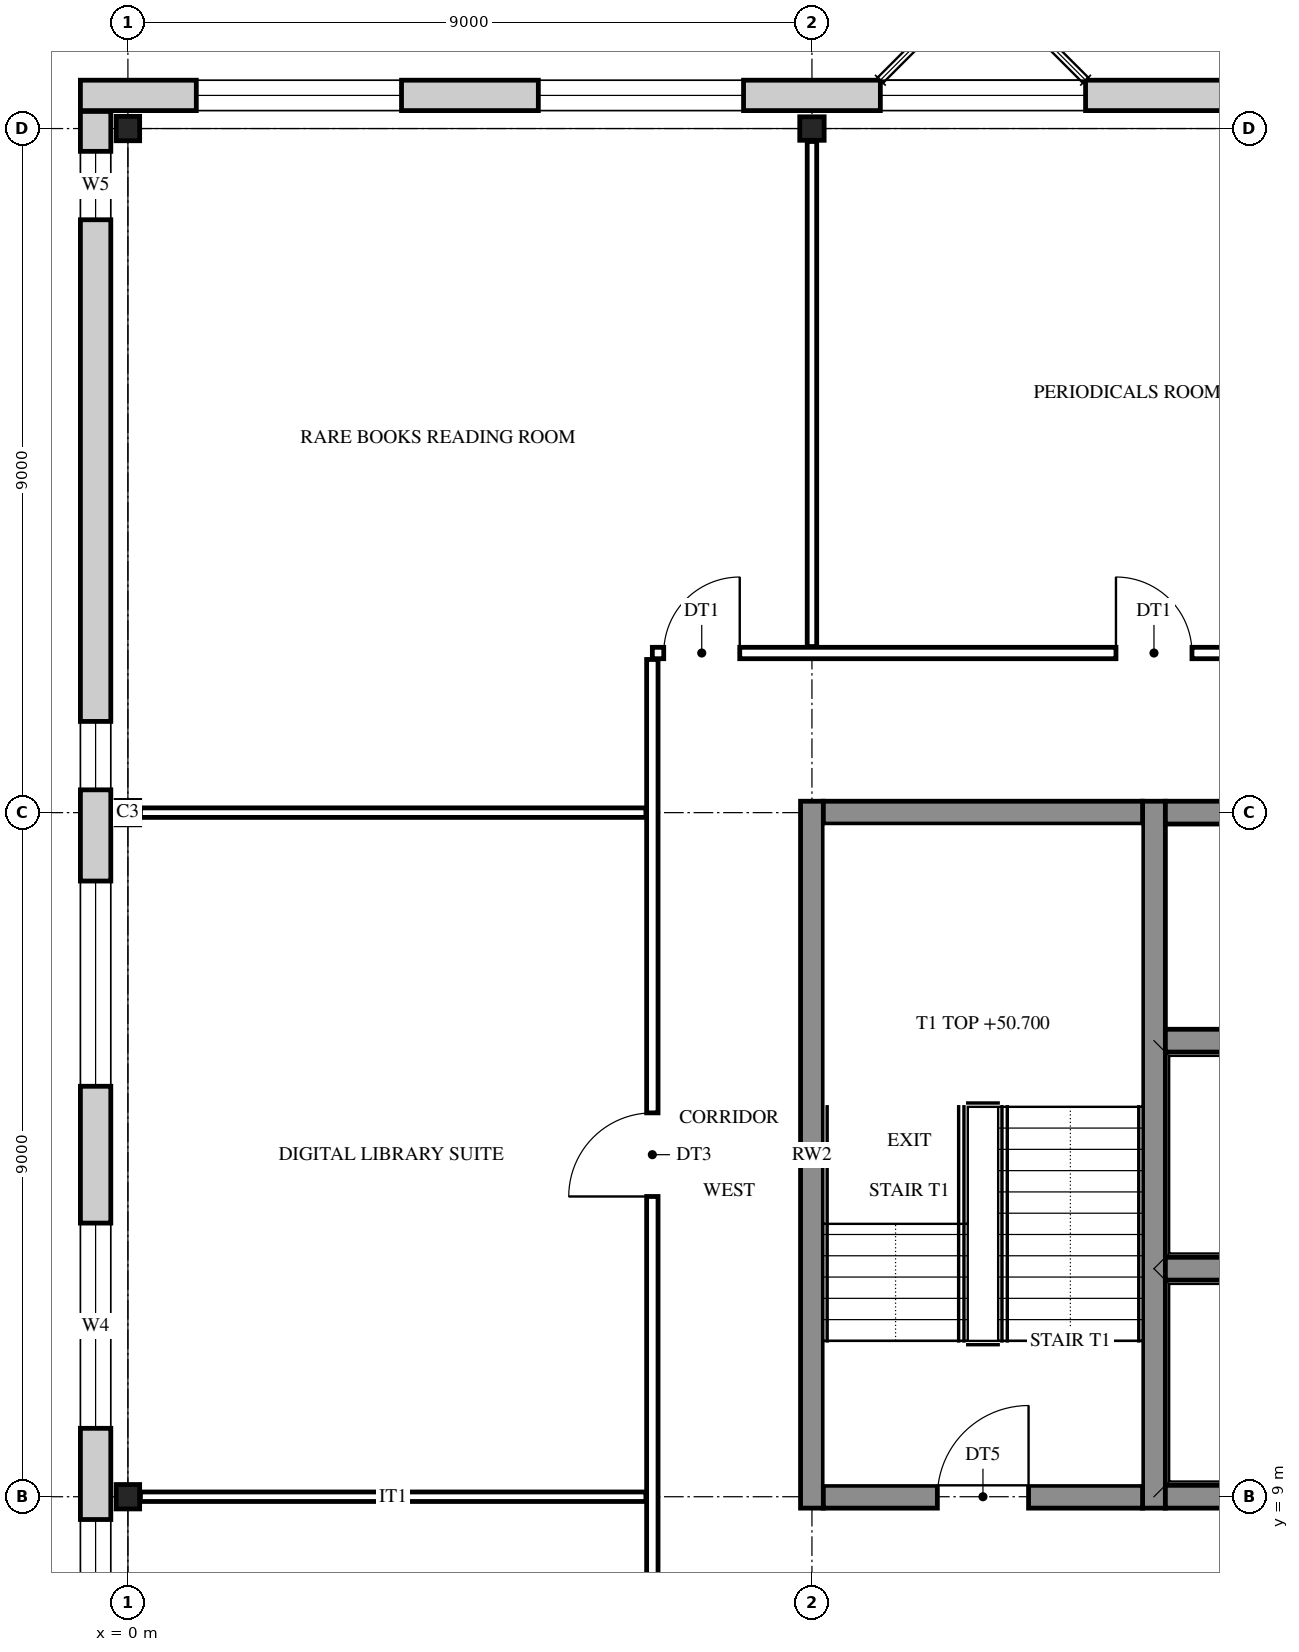
"""IFC4 building model, lengths in metres.
Left out: names, types, materials, properties, quantities, classifications, styles, units other than length and angle.
Written with IfcOpenShell. Run it as: python <this file> out.ifc"""

import sys

from ifc_helpers import new_model, si_unit, direction, frame, frame_2d, origin, origin_2d, place, context, subcontext, project, spatial, rectangle, i_section, extrude, element, fill, save


model = new_model("IFC4")
c1 = context("Model", 3, precision=1e-05, world=origin(), true_north=direction((0.0, 1.0)))
c2 = subcontext(c1, "Body", "Model", "MODEL_VIEW")
j1 = project(units=[si_unit("LENGTHUNIT", "METRE"), si_unit("PLANEANGLEUNIT", "RADIAN")], contexts=[c1])
p1 = place(None, origin())
s1 = spatial("IfcSite", under=j1, at=p1, CompositionType="ELEMENT")
p2 = place(p1, origin())
s2 = spatial("IfcBuilding", under=s1, at=p2, CompositionType="ELEMENT")
p3 = place(p2, frame((0.0, 0.0, 48.6)))
s3 = spatial("IfcBuildingStorey", under=s2, at=p3, CompositionType="ELEMENT", Elevation=48.6)
for number, where, z_axis, x_axis in (
    (1, (0.0, 9.0, 0.0), (0.0, 0.0, 1.0), (1.0, 0.0, 0.0)),
    (2, (0.0, 18.0, 0.0), (0.0, 0.0, 1.0), (1.0, 0.0, 0.0)),
    (3, (0.0, 27.0, 0.0), (0.0, 0.0, 1.0), (1.0, 0.0, 0.0)),
    (4, (9.0, 27.0, 0.0), (0.0, 0.0, 1.0), (0.0, 1.0, 0.0)),
):
    element("IfcColumn", number, at=place(p3, frame(where, z_axis=z_axis, x_axis=x_axis)), inside=s3, PredefinedType="COLUMN", context=c2, shape_type="SweptSolid", body=[
        extrude(i_section(OverallWidth=0.309, OverallDepth=0.321, WebThickness=0.014, FlangeThickness=0.022, FilletRadius=0.017, at=origin_2d()), origin(), (0.0, 0.0, 1.0), 4.2),
    ])
for number, where, z_axis, x_axis in (
    (5, (9.0, 8.85, 0.0), (0.0, 0.0, 1.0), (0.0, 1.0, 0.0)),
    (6, (13.5, 8.85, 0.0), (0.0, 0.0, 1.0), (0.0, 1.0, 0.0)),
):
    element("IfcWall", number, at=place(p3, frame(where, z_axis=z_axis, x_axis=x_axis)), inside=s3, PredefinedType="SHEAR", context=c2, shape_type="SweptSolid", body=[
        extrude(rectangle(XDim=9.3, YDim=0.3, at=frame_2d((4.65, 0.0))), origin(), (0.0, 0.0, 1.0), 4.2),
    ])
p4 = place(p3, frame((9.15, 9.0, 0.0), z_axis=(0.0, 0.0, 1.0), x_axis=(1.0, 0.0, 0.0)))
e7 = element("IfcWall", 7, at=p4, inside=s3, PredefinedType="SHEAR", context=c2, shape_type="SweptSolid", body=[
    extrude(rectangle(XDim=4.2, YDim=0.3, at=frame_2d((2.1, 0.0))), origin(), (0.0, 0.0, 1.0), 4.2),
])
p5 = place(p4, frame((1.5, 0.0, 0.0)))
e8 = element("IfcOpeningElement", 8, at=p5, cuts=e7, PredefinedType="OPENING", context=c2, shape_type="SweptSolid", body=[
    extrude(rectangle(XDim=1.2, YDim=2.1, at=frame_2d((0.6, 1.05))), frame((0.0, 0.16, 0.0), z_axis=(0.0, -1.0, 0.0), x_axis=(1.0, 0.0, 0.0)), (0.0, 0.0, 1.0), 0.32),
])
for number, where, z_axis, x_axis in (
    (9, (13.65, 9.0, 0.0), (0.0, 0.0, 1.0), (1.0, 0.0, 0.0)),
    (10, (13.65, 12.0, 0.0), (0.0, 0.0, 1.0), (1.0, 0.0, 0.0)),
    (11, (13.65, 15.0, 0.0), (0.0, 0.0, 1.0), (1.0, 0.0, 0.0)),
):
    element("IfcWall", number, at=place(p3, frame(where, z_axis=z_axis, x_axis=x_axis)), inside=s3, PredefinedType="SHEAR", context=c2, shape_type="SweptSolid", body=[
        extrude(rectangle(XDim=2.7, YDim=0.3, at=frame_2d((1.35, 0.0))), origin(), (0.0, 0.0, 1.0), 4.2),
    ])
p6 = place(p3, frame((9.15, 18.0, 0.0), z_axis=(0.0, 0.0, 1.0), x_axis=(1.0, 0.0, 0.0)))
e12 = element("IfcWall", 12, at=p6, inside=s3, PredefinedType="SHEAR", context=c2, shape_type="SweptSolid", body=[
    extrude(rectangle(XDim=4.2, YDim=0.3, at=frame_2d((2.1, 0.0))), origin(), (0.0, 0.0, 1.0), 4.2),
])
p7 = place(p3, frame((13.65, 18.0, 0.0), z_axis=(0.0, 0.0, 1.0), x_axis=(1.0, 0.0, 0.0)))
e13 = element("IfcWall", 13, at=p7, inside=s3, PredefinedType="SHEAR", context=c2, shape_type="SweptSolid", body=[
    extrude(rectangle(XDim=2.7, YDim=0.3, at=frame_2d((1.35, 0.0))), origin(), (0.0, 0.0, 1.0), 4.2),
])
p8 = place(p3, frame((-0.425, -0.225, 0.0), z_axis=(0.0, 0.0, 1.0), x_axis=(0.0, 1.0, 0.0)))
e14 = element("IfcWall", 14, at=p8, inside=s3, PredefinedType="STANDARD", context=c2, shape_type="SweptSolid", body=[
    extrude(rectangle(XDim=27.45, YDim=0.4, at=frame_2d((13.725, 0.0))), origin(), (0.0, 0.0, 1.0), 4.2),
])
p9 = place(p8, frame((0.525, 0.0, 0.9)))
e15 = element("IfcOpeningElement", 15, at=p9, cuts=e14, PredefinedType="OPENING", context=c2, shape_type="SweptSolid", body=[
    extrude(rectangle(XDim=0.9, YDim=2.0, at=frame_2d((0.45, 1.0))), frame((0.0, 0.21, 0.0), z_axis=(0.0, -1.0, 0.0), x_axis=(1.0, 0.0, 0.0)), (0.0, 0.0, 1.0), 0.42),
])
p10 = place(p8, frame((8.025, 0.0, 0.9)))
e16 = element("IfcOpeningElement", 16, at=p10, cuts=e14, PredefinedType="OPENING", context=c2, shape_type="SweptSolid", body=[
    extrude(rectangle(XDim=0.9, YDim=2.0, at=frame_2d((0.45, 1.0))), frame((0.0, 0.21, 0.0), z_axis=(0.0, -1.0, 0.0), x_axis=(1.0, 0.0, 0.0)), (0.0, 0.0, 1.0), 0.42),
])
p11 = place(p8, frame((10.125, 0.0, 0.9)))
e17 = element("IfcOpeningElement", 17, at=p11, cuts=e14, PredefinedType="OPENING", context=c2, shape_type="SweptSolid", body=[
    extrude(rectangle(XDim=2.7, YDim=2.5, at=frame_2d((1.35, 1.25))), frame((0.0, 0.21, 0.0), z_axis=(0.0, -1.0, 0.0), x_axis=(1.0, 0.0, 0.0)), (0.0, 0.0, 1.0), 0.42),
])
p12 = place(p8, frame((14.625, 0.0, 0.9)))
e18 = element("IfcOpeningElement", 18, at=p12, cuts=e14, PredefinedType="OPENING", context=c2, shape_type="SweptSolid", body=[
    extrude(rectangle(XDim=2.7, YDim=2.5, at=frame_2d((1.35, 1.25))), frame((0.0, 0.21, 0.0), z_axis=(0.0, -1.0, 0.0), x_axis=(1.0, 0.0, 0.0)), (0.0, 0.0, 1.0), 0.42),
])
p13 = place(p8, frame((18.525, 0.0, 0.9)))
e19 = element("IfcOpeningElement", 19, at=p13, cuts=e14, PredefinedType="OPENING", context=c2, shape_type="SweptSolid", body=[
    extrude(rectangle(XDim=0.9, YDim=2.0, at=frame_2d((0.45, 1.0))), frame((0.0, 0.21, 0.0), z_axis=(0.0, -1.0, 0.0), x_axis=(1.0, 0.0, 0.0)), (0.0, 0.0, 1.0), 0.42),
])
p14 = place(p8, frame((26.025, 0.0, 0.9)))
e20 = element("IfcOpeningElement", 20, at=p14, cuts=e14, PredefinedType="OPENING", context=c2, shape_type="SweptSolid", body=[
    extrude(rectangle(XDim=0.9, YDim=2.0, at=frame_2d((0.45, 1.0))), frame((0.0, 0.21, 0.0), z_axis=(0.0, -1.0, 0.0), x_axis=(1.0, 0.0, 0.0)), (0.0, 0.0, 1.0), 0.42),
])
p15 = place(p3, frame((-0.625, 27.436, 0.0), z_axis=(0.0, 0.0, 1.0), x_axis=(1.0, 0.0, 0.0)))
e21 = element("IfcWall", 21, at=p15, inside=s3, PredefinedType="STANDARD", context=c2, shape_type="SweptSolid", body=[
    extrude(rectangle(XDim=32.75, YDim=0.4, at=frame_2d((16.375, 0.0))), origin(), (0.0, 0.0, 1.0), 4.2),
])
p16 = place(p15, frame((1.525, 0.0, 0.9)))
e22 = element("IfcOpeningElement", 22, at=p16, cuts=e21, PredefinedType="OPENING", context=c2, shape_type="SweptSolid", body=[
    extrude(rectangle(XDim=2.7, YDim=2.5, at=frame_2d((1.35, 1.25))), frame((0.0, 0.21, 0.0), z_axis=(0.0, -1.0, 0.0), x_axis=(1.0, 0.0, 0.0)), (0.0, 0.0, 1.0), 0.42),
])
p17 = place(p15, frame((6.025, 0.0, 0.9)))
e23 = element("IfcOpeningElement", 23, at=p17, cuts=e21, PredefinedType="OPENING", context=c2, shape_type="SweptSolid", body=[
    extrude(rectangle(XDim=2.7, YDim=2.5, at=frame_2d((1.35, 1.25))), frame((0.0, 0.21, 0.0), z_axis=(0.0, -1.0, 0.0), x_axis=(1.0, 0.0, 0.0)), (0.0, 0.0, 1.0), 0.42),
])
p18 = place(p15, frame((10.525, 0.0, 0.9)))
e24 = element("IfcOpeningElement", 24, at=p18, cuts=e21, PredefinedType="OPENING", context=c2, shape_type="SweptSolid", body=[
    extrude(rectangle(XDim=2.7, YDim=2.5, at=frame_2d((1.35, 1.25))), frame((0.0, 0.21, 0.0), z_axis=(0.0, -1.0, 0.0), x_axis=(1.0, 0.0, 0.0)), (0.0, 0.0, 1.0), 0.42),
])
p19 = place(p15, frame((15.025, 0.0, 0.9)))
e25 = element("IfcOpeningElement", 25, at=p19, cuts=e21, PredefinedType="OPENING", context=c2, shape_type="SweptSolid", body=[
    extrude(rectangle(XDim=2.7, YDim=2.5, at=frame_2d((1.35, 1.25))), frame((0.0, 0.21, 0.0), z_axis=(0.0, -1.0, 0.0), x_axis=(1.0, 0.0, 0.0)), (0.0, 0.0, 1.0), 0.42),
])
p20 = place(p15, frame((19.525, 0.0, 0.9)))
e26 = element("IfcOpeningElement", 26, at=p20, cuts=e21, PredefinedType="OPENING", context=c2, shape_type="SweptSolid", body=[
    extrude(rectangle(XDim=2.7, YDim=2.5, at=frame_2d((1.35, 1.25))), frame((0.0, 0.21, 0.0), z_axis=(0.0, -1.0, 0.0), x_axis=(1.0, 0.0, 0.0)), (0.0, 0.0, 1.0), 0.42),
])
p21 = place(p15, frame((24.025, 0.0, 0.9)))
e27 = element("IfcOpeningElement", 27, at=p21, cuts=e21, PredefinedType="OPENING", context=c2, shape_type="SweptSolid", body=[
    extrude(rectangle(XDim=2.7, YDim=2.5, at=frame_2d((1.35, 1.25))), frame((0.0, 0.21, 0.0), z_axis=(0.0, -1.0, 0.0), x_axis=(1.0, 0.0, 0.0)), (0.0, 0.0, 1.0), 0.42),
])
p22 = place(p15, frame((28.525, 0.0, 0.9)))
e28 = element("IfcOpeningElement", 28, at=p22, cuts=e21, PredefinedType="OPENING", context=c2, shape_type="SweptSolid", body=[
    extrude(rectangle(XDim=2.7, YDim=2.5, at=frame_2d((1.35, 1.25))), frame((0.0, 0.21, 0.0), z_axis=(0.0, -1.0, 0.0), x_axis=(1.0, 0.0, 0.0)), (0.0, 0.0, 1.0), 0.42),
])
p23 = place(p3, frame((6.9, 6.985, 0.0), z_axis=(0.0, 0.0, 1.0), x_axis=(0.0, 1.0, 0.0)))
e29 = element("IfcWall", 29, at=p23, inside=s3, PredefinedType="PARTITIONING", context=c2, shape_type="SweptSolid", body=[
    extrude(rectangle(XDim=13.03, YDim=0.15, at=frame_2d((6.515, 0.0))), origin(), (0.0, 0.0, 1.0), 3.542),
])
p24 = place(p23, frame((5.965, 0.0, 0.0)))
e30 = element("IfcOpeningElement", 30, at=p24, cuts=e29, PredefinedType="OPENING", context=c2, shape_type="SweptSolid", body=[
    extrude(rectangle(XDim=1.1, YDim=2.1, at=frame_2d((0.55, 1.05))), frame((0.0, 0.085, 0.0), z_axis=(0.0, -1.0, 0.0), x_axis=(1.0, 0.0, 0.0)), (0.0, 0.0, 1.0), 0.17),
])
p25 = place(p3, frame((9.0, 20.185, 0.0), z_axis=(0.0, 0.0, 1.0), x_axis=(0.0, 1.0, 0.0)))
e31 = element("IfcWall", 31, at=p25, inside=s3, PredefinedType="PARTITIONING", context=c2, shape_type="SweptSolid", body=[
    extrude(rectangle(XDim=6.645, YDim=0.125, at=frame_2d((3.322, 0.0))), origin(), (0.0, 0.0, 1.0), 3.542),
])
for number, where, z_axis, x_axis in (
    (32, (0.165, 9.0, 0.0), (0.0, 0.0, 1.0), (1.0, 0.0, 0.0)),
    (33, (0.165, 18.0, 0.0), (0.0, 0.0, 1.0), (1.0, 0.0, 0.0)),
):
    element("IfcWall", number, at=place(p3, frame(where, z_axis=z_axis, x_axis=x_axis)), inside=s3, PredefinedType="PARTITIONING", context=c2, shape_type="SweptSolid", body=[
        extrude(rectangle(XDim=6.65, YDim=0.125, at=frame_2d((3.325, 0.0))), origin(), (0.0, 0.0, 1.0), 3.542),
    ])
p26 = place(p3, frame((6.9, 20.1, 0.0), z_axis=(0.0, 0.0, 1.0), x_axis=(1.0, 0.0, 0.0)))
e34 = element("IfcWall", 34, at=p26, inside=s3, PredefinedType="PARTITIONING", context=c2, shape_type="SweptSolid", body=[
    extrude(rectangle(XDim=20.1, YDim=0.15, at=frame_2d((10.05, 0.0))), origin(), (0.0, 0.0, 1.0), 3.542),
])
p27 = place(p26, frame((0.15, 0.0, 0.0)))
e35 = element("IfcOpeningElement", 35, at=p27, cuts=e34, PredefinedType="OPENING", context=c2, shape_type="SweptSolid", body=[
    extrude(rectangle(XDim=1.0, YDim=2.1, at=frame_2d((0.5, 1.05))), frame((0.0, 0.085, 0.0), z_axis=(0.0, -1.0, 0.0), x_axis=(1.0, 0.0, 0.0)), (0.0, 0.0, 1.0), 0.17),
])
p28 = place(p26, frame((6.1, 0.0, 0.0)))
e36 = element("IfcOpeningElement", 36, at=p28, cuts=e34, PredefinedType="OPENING", context=c2, shape_type="SweptSolid", body=[
    extrude(rectangle(XDim=1.0, YDim=2.1, at=frame_2d((0.5, 1.05))), frame((0.0, 0.085, 0.0), z_axis=(0.0, -1.0, 0.0), x_axis=(1.0, 0.0, 0.0)), (0.0, 0.0, 1.0), 0.17),
])
p29 = place(p26, frame((16.3, 0.0, 0.0)))
e37 = element("IfcOpeningElement", 37, at=p29, cuts=e34, PredefinedType="OPENING", context=c2, shape_type="SweptSolid", body=[
    extrude(rectangle(XDim=1.0, YDim=2.1, at=frame_2d((0.5, 1.05))), frame((0.0, 0.085, 0.0), z_axis=(0.0, -1.0, 0.0), x_axis=(1.0, 0.0, 0.0)), (0.0, 0.0, 1.0), 0.17),
])
p30 = place(p10, origin())
e38 = element("IfcWindow", 38, at=p30, inside=s3, PartitioningType="SINGLE_PANEL", PredefinedType="WINDOW", context=c2, shape_type="SweptSolid", body=[
    extrude(rectangle(XDim=0.9, YDim=2.0, at=frame_2d((0.45, 1.0))), frame((0.0, 0.03, 0.0), z_axis=(0.0, -1.0, 0.0), x_axis=(1.0, 0.0, 0.0)), (0.0, 0.0, 1.0), 0.06),
])
fill(e16, e38)
p31 = place(p11, origin())
e39 = element("IfcWindow", 39, at=p31, inside=s3, PartitioningType="SINGLE_PANEL", PredefinedType="WINDOW", context=c2, shape_type="SweptSolid", body=[
    extrude(rectangle(XDim=2.7, YDim=2.5, at=frame_2d((1.35, 1.25))), frame((0.0, 0.03, 0.0), z_axis=(0.0, -1.0, 0.0), x_axis=(1.0, 0.0, 0.0)), (0.0, 0.0, 1.0), 0.06),
])
fill(e17, e39)
p32 = place(p12, origin())
e40 = element("IfcWindow", 40, at=p32, inside=s3, PartitioningType="SINGLE_PANEL", PredefinedType="WINDOW", context=c2, shape_type="SweptSolid", body=[
    extrude(rectangle(XDim=2.7, YDim=2.5, at=frame_2d((1.35, 1.25))), frame((0.0, 0.03, 0.0), z_axis=(0.0, -1.0, 0.0), x_axis=(1.0, 0.0, 0.0)), (0.0, 0.0, 1.0), 0.06),
])
fill(e18, e40)
p33 = place(p13, origin())
e41 = element("IfcWindow", 41, at=p33, inside=s3, PartitioningType="SINGLE_PANEL", PredefinedType="WINDOW", context=c2, shape_type="SweptSolid", body=[
    extrude(rectangle(XDim=0.9, YDim=2.0, at=frame_2d((0.45, 1.0))), frame((0.0, 0.03, 0.0), z_axis=(0.0, -1.0, 0.0), x_axis=(1.0, 0.0, 0.0)), (0.0, 0.0, 1.0), 0.06),
])
fill(e19, e41)
p34 = place(p14, origin())
e42 = element("IfcWindow", 42, at=p34, inside=s3, PartitioningType="SINGLE_PANEL", PredefinedType="WINDOW", context=c2, shape_type="SweptSolid", body=[
    extrude(rectangle(XDim=0.9, YDim=2.0, at=frame_2d((0.45, 1.0))), frame((0.0, 0.03, 0.0), z_axis=(0.0, -1.0, 0.0), x_axis=(1.0, 0.0, 0.0)), (0.0, 0.0, 1.0), 0.06),
])
fill(e20, e42)
p35 = place(p16, origin())
e43 = element("IfcWindow", 43, at=p35, inside=s3, PartitioningType="SINGLE_PANEL", PredefinedType="WINDOW", context=c2, shape_type="SweptSolid", body=[
    extrude(rectangle(XDim=2.7, YDim=2.5, at=frame_2d((1.35, 1.25))), frame((0.0, 0.03, 0.0), z_axis=(0.0, -1.0, 0.0), x_axis=(1.0, 0.0, 0.0)), (0.0, 0.0, 1.0), 0.06),
])
fill(e22, e43)
p36 = place(p17, origin())
e44 = element("IfcWindow", 44, at=p36, inside=s3, PartitioningType="SINGLE_PANEL", PredefinedType="WINDOW", context=c2, shape_type="SweptSolid", body=[
    extrude(rectangle(XDim=2.7, YDim=2.5, at=frame_2d((1.35, 1.25))), frame((0.0, 0.03, 0.0), z_axis=(0.0, -1.0, 0.0), x_axis=(1.0, 0.0, 0.0)), (0.0, 0.0, 1.0), 0.06),
])
fill(e23, e44)
p37 = place(p18, origin())
e45 = element("IfcWindow", 45, at=p37, inside=s3, PartitioningType="SINGLE_PANEL", PredefinedType="WINDOW", context=c2, shape_type="SweptSolid", body=[
    extrude(rectangle(XDim=2.7, YDim=2.5, at=frame_2d((1.35, 1.25))), frame((0.0, 0.03, 0.0), z_axis=(0.0, -1.0, 0.0), x_axis=(1.0, 0.0, 0.0)), (0.0, 0.0, 1.0), 0.06),
])
fill(e24, e45)
p38 = place(p5, origin())
e46 = element("IfcDoor", 46, at=p38, inside=s3, OperationType="SINGLE_SWING_RIGHT", PredefinedType="DOOR", context=c2, shape_type="SweptSolid", body=[
    extrude(rectangle(XDim=1.2, YDim=2.1, at=frame_2d((0.6, 1.05))), frame((0.0, 0.025, 0.0), z_axis=(0.0, -1.0, 0.0), x_axis=(1.0, 0.0, 0.0)), (0.0, 0.0, 1.0), 0.05),
])
fill(e8, e46)
p39 = place(p27, origin())
e47 = element("IfcDoor", 47, at=p39, inside=s3, OperationType="SINGLE_SWING_RIGHT", PredefinedType="DOOR", context=c2, shape_type="SweptSolid", body=[
    extrude(rectangle(XDim=1.0, YDim=2.1, at=frame_2d((0.5, 1.05))), frame((0.0, 0.025, 0.0), z_axis=(0.0, -1.0, 0.0), x_axis=(1.0, 0.0, 0.0)), (0.0, 0.0, 1.0), 0.05),
])
fill(e35, e47)
p40 = place(p28, origin())
e48 = element("IfcDoor", 48, at=p40, inside=s3, OperationType="SINGLE_SWING_LEFT", PredefinedType="DOOR", context=c2, shape_type="SweptSolid", body=[
    extrude(rectangle(XDim=1.0, YDim=2.1, at=frame_2d((0.5, 1.05))), frame((0.0, 0.025, 0.0), z_axis=(0.0, -1.0, 0.0), x_axis=(1.0, 0.0, 0.0)), (0.0, 0.0, 1.0), 0.05),
])
fill(e36, e48)
p41 = place(p24, origin())
e49 = element("IfcDoor", 49, at=p41, inside=s3, OperationType="SINGLE_SWING_LEFT", PredefinedType="DOOR", context=c2, shape_type="SweptSolid", body=[
    extrude(rectangle(XDim=1.1, YDim=2.1, at=frame_2d((0.55, 1.05))), frame((0.0, 0.025, 0.0), z_axis=(0.0, -1.0, 0.0), x_axis=(1.0, 0.0, 0.0)), (0.0, 0.0, 1.0), 0.05),
])
fill(e30, e49)
save(model, sys.argv[1])
